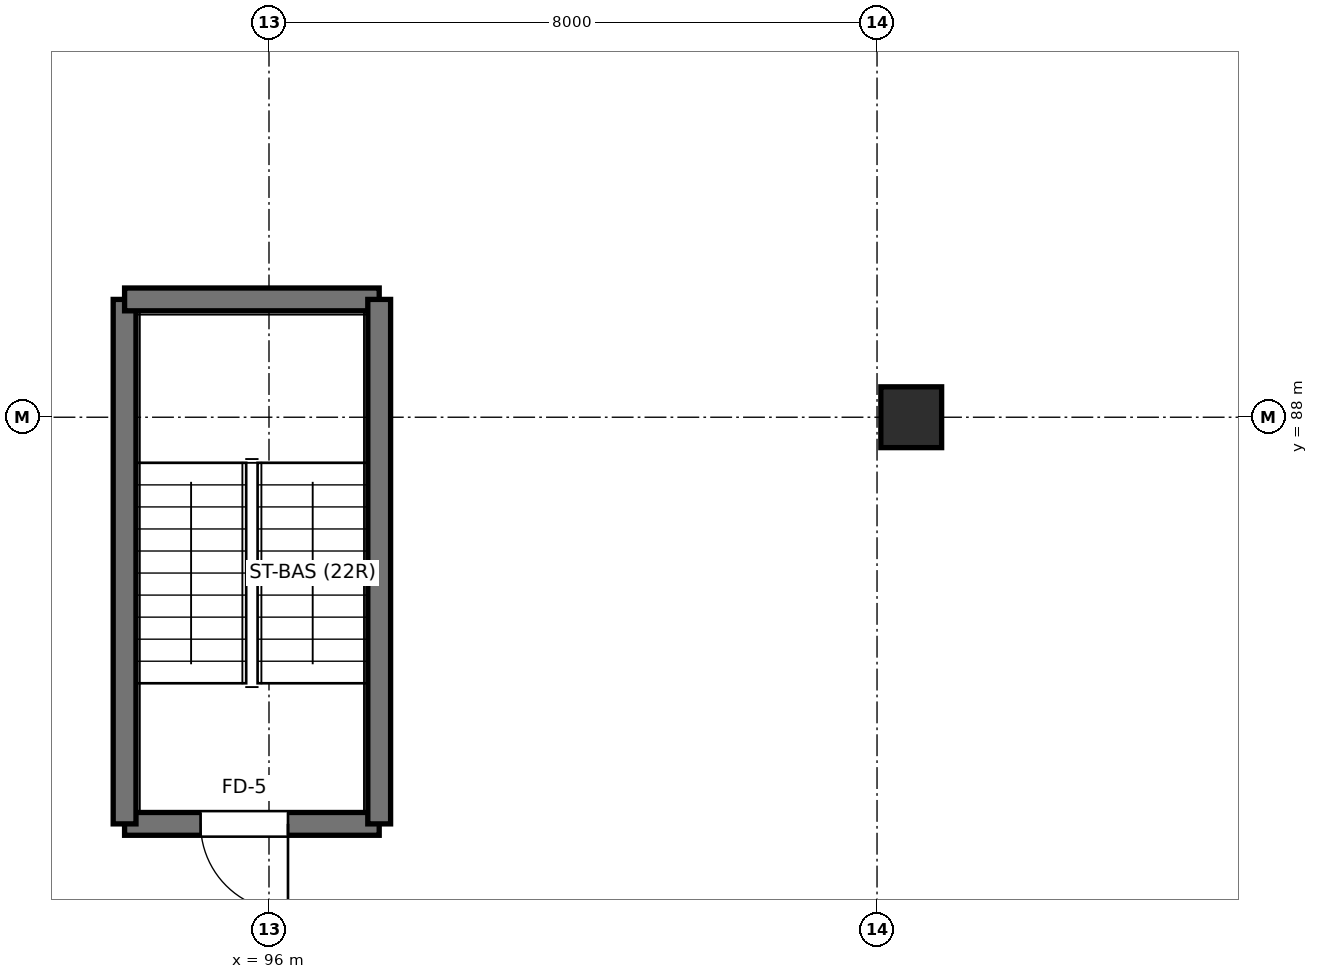
"""IFC4 building model, lengths in metres.
Left out: names, types, materials, properties, quantities, classifications, styles, units other than length and angle.
Written with IfcOpenShell. Run it as: python <this file> out.ifc"""

import sys

from ifc_helpers import new_model, si_unit, direction, frame, frame_2d, origin, origin_2d, place, context, subcontext, project, spatial, rectangle, extrude, element, fill, save


model = new_model("IFC4")
c1 = context("Model", 3, precision=1e-05, world=origin(), true_north=direction((0.0, 1.0)))
c2 = subcontext(c1, "Body", "Model", "MODEL_VIEW")
j1 = project(units=[si_unit("LENGTHUNIT", "METRE"), si_unit("PLANEANGLEUNIT", "RADIAN")], contexts=[c1])
p1 = place(None, origin())
s1 = spatial("IfcSite", under=j1, at=p1, CompositionType="ELEMENT")
p2 = place(p1, origin())
s2 = spatial("IfcBuilding", under=s1, at=p2, CompositionType="ELEMENT")
p3 = place(p2, frame((0.0, 0.0, -3.84)))
s3 = spatial("IfcBuildingStorey", under=s2, at=p3, CompositionType="ELEMENT", Elevation=-3.84)
p4 = place(p3, frame((104.45, 88.0, 0.0), z_axis=(0.0, 0.0, 1.0), x_axis=(1.0, 0.0, 0.0)))
e1 = element("IfcColumn", 1, at=p4, inside=s3, PredefinedType="COLUMN", context=c2, shape_type="SweptSolid", body=[
    extrude(rectangle(XDim=0.8, YDim=0.8, at=origin_2d()), origin(), (0.0, 0.0, 1.0), 3.84),
])
p5 = place(p3, frame((97.45, 82.65, 0.0), z_axis=(0.0, 0.0, 1.0), x_axis=(-1.0, 0.0, 0.0)))
e2 = element("IfcWall", 2, at=p5, inside=s3, PredefinedType="SHEAR", context=c2, shape_type="SweptSolid", body=[
    extrude(rectangle(XDim=3.35, YDim=0.3, at=frame_2d((1.675, 0.0))), origin(), (0.0, 0.0, 1.0), 3.52),
])
p6 = place(p5, frame((1.2, 0.0, 0.0)))
e3 = element("IfcOpeningElement", 3, at=p6, cuts=e2, PredefinedType="OPENING", context=c2, shape_type="SweptSolid", body=[
    extrude(rectangle(XDim=1.15, YDim=2.2, at=frame_2d((0.575, 1.1))), frame((0.0, 0.16, 0.0), z_axis=(0.0, -1.0, 0.0), x_axis=(1.0, 0.0, 0.0)), (0.0, 0.0, 1.0), 0.32),
])
p7 = place(p3, frame((94.1, 82.65, 0.0), z_axis=(0.0, 0.0, 1.0), x_axis=(0.0, 1.0, 0.0)))
e4 = element("IfcWall", 4, at=p7, inside=s3, PredefinedType="SHEAR", context=c2, shape_type="SweptSolid", body=[
    extrude(rectangle(XDim=6.9, YDim=0.3, at=frame_2d((3.45, 0.0))), origin(), (0.0, 0.0, 1.0), 3.52),
])
p8 = place(p3, frame((94.1, 89.55, 0.0), z_axis=(0.0, 0.0, 1.0), x_axis=(1.0, 0.0, 0.0)))
e5 = element("IfcWall", 5, at=p8, inside=s3, PredefinedType="SHEAR", context=c2, shape_type="SweptSolid", body=[
    extrude(rectangle(XDim=3.35, YDim=0.3, at=frame_2d((1.675, 0.0))), origin(), (0.0, 0.0, 1.0), 3.52),
])
p9 = place(p3, frame((97.45, 89.55, 0.0), z_axis=(0.0, 0.0, 1.0), x_axis=(0.0, -1.0, 0.0)))
e6 = element("IfcWall", 6, at=p9, inside=s3, PredefinedType="SHEAR", context=c2, shape_type="SweptSolid", body=[
    extrude(rectangle(XDim=6.9, YDim=0.3, at=frame_2d((3.45, 0.0))), origin(), (0.0, 0.0, 1.0), 3.52),
])
p10 = place(p6, origin())
e7 = element("IfcDoor", 7, at=p10, inside=s3, OperationType="SINGLE_SWING_LEFT", PredefinedType="DOOR", context=c2, shape_type="SweptSolid", body=[
    extrude(rectangle(XDim=1.15, YDim=2.2, at=frame_2d((0.575, 1.1))), frame((0.0, 0.025, 0.0), z_axis=(0.0, -1.0, 0.0), x_axis=(1.0, 0.0, 0.0)), (0.0, 0.0, 1.0), 0.05),
])
fill(e3, e7)
save(model, sys.argv[1])
